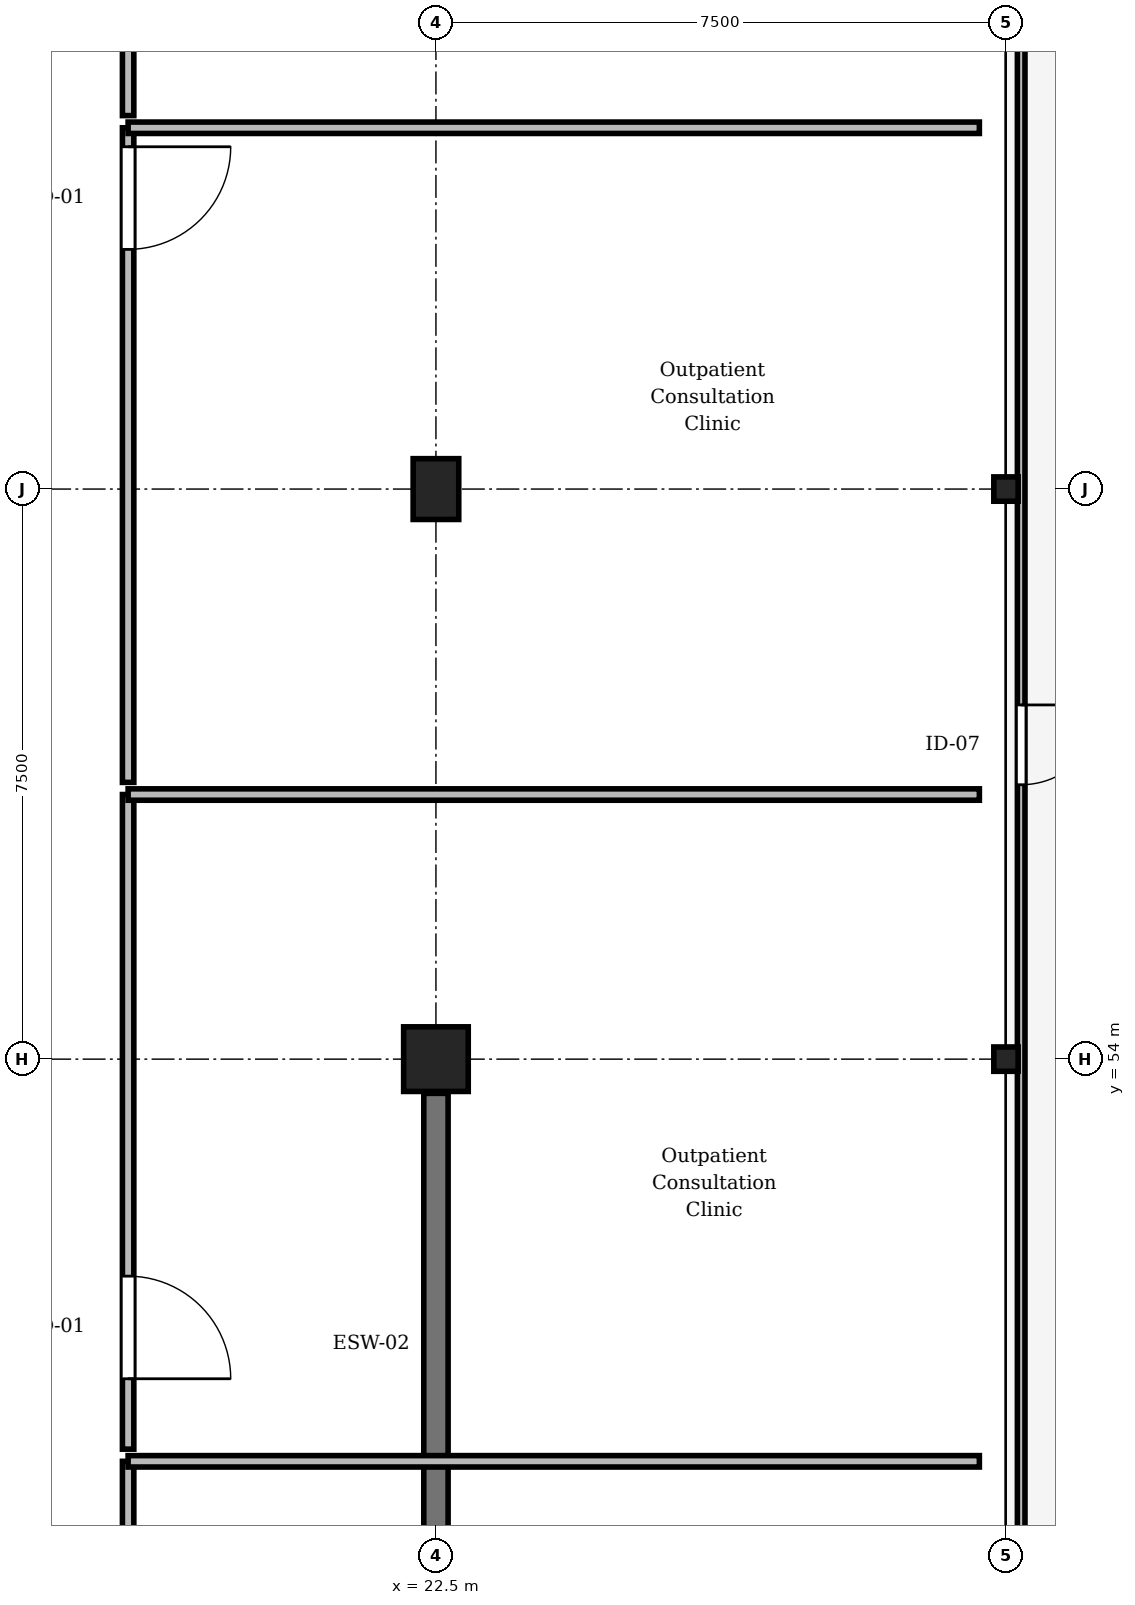
"""IFC4 building model, lengths in metres.
Left out: names, types, materials, properties, quantities, classifications, styles, units other than length and angle.
Written with IfcOpenShell. Run it as: python <this file> out.ifc"""

import sys

from ifc_helpers import new_model, si_unit, direction, frame, frame_2d, origin, origin_2d, place, context, subcontext, project, spatial, rectangle, extrude, element, fill, save


model = new_model("IFC4")
c1 = context("Model", 3, precision=1e-05, world=origin(), true_north=direction((0.0, 1.0)))
c2 = subcontext(c1, "Body", "Model", "MODEL_VIEW")
j1 = project(units=[si_unit("LENGTHUNIT", "METRE"), si_unit("PLANEANGLEUNIT", "RADIAN")], contexts=[c1])
p1 = place(None, origin())
s1 = spatial("IfcSite", under=j1, at=p1, CompositionType="ELEMENT")
p2 = place(p1, origin())
s2 = spatial("IfcBuilding", under=s1, at=p2, CompositionType="ELEMENT")
p3 = place(p2, frame((0.0, 0.0, 4.8)))
s3 = spatial("IfcBuildingStorey", under=s2, at=p3, CompositionType="ELEMENT", Elevation=4.8)
p4 = place(p3, frame((22.5, 54.0, 0.0), z_axis=(0.0, 0.0, 1.0), x_axis=(1.0, 0.0, 0.0)))
e1 = element("IfcColumn", 1, at=p4, inside=s3, PredefinedType="COLUMN", context=c2, shape_type="SweptSolid", body=[
    extrude(rectangle(XDim=0.85, YDim=0.85, at=origin_2d()), origin(), (0.0, 0.0, 1.0), 4.5),
])
p5 = place(p3, frame((22.5, 61.5, 0.0), z_axis=(0.0, 0.0, 1.0), x_axis=(1.0, 0.0, 0.0)))
e2 = element("IfcColumn", 2, at=p5, inside=s3, PredefinedType="COLUMN", context=c2, shape_type="SweptSolid", body=[
    extrude(rectangle(XDim=0.6, YDim=0.8, at=origin_2d()), origin(), (0.0, 0.0, 1.0), 4.5),
])
for number, where, z_axis, x_axis in (
    (3, (30.0, 54.0, 0.0), (0.0, 0.0, 1.0), (1.0, 0.0, 0.0)),
    (4, (30.0, 61.5, 0.0), (0.0, 0.0, 1.0), (1.0, 0.0, 0.0)),
):
    element("IfcColumn", number, at=place(p3, frame(where, z_axis=z_axis, x_axis=x_axis)), inside=s3, PredefinedType="COLUMN", context=c2, shape_type="SweptSolid", body=[
        extrude(rectangle(XDim=0.32, YDim=0.32, at=origin_2d()), origin(), (0.0, 0.0, 1.0), 4.5),
    ])
p6 = place(p3, frame((22.5, 46.95, 0.0), z_axis=(0.0, 0.0, 1.0), x_axis=(0.0, 1.0, 0.0)))
e5 = element("IfcWall", 5, at=p6, inside=s3, PredefinedType="SHEAR", context=c2, shape_type="SweptSolid", body=[
    extrude(rectangle(XDim=6.6, YDim=0.32, at=frame_2d((3.3, 0.0))), origin(), (0.0, 0.0, 1.0), 3.63),
])
p7 = place(p3, frame((18.45, 48.709, 0.0), z_axis=(0.0, 0.0, 1.0), x_axis=(0.0, -1.0, 0.0)))
e6 = element("IfcWall", 6, at=p7, inside=s3, PredefinedType="PARTITIONING", context=c2, shape_type="SweptSolid", body=[
    extrude(rectangle(XDim=8.612, YDim=0.15, at=frame_2d((4.306, 0.0))), origin(), (0.0, 0.0, 1.0), 3.765),
])
p8 = place(p7, frame((4.983, 0.0, 0.0)))
e7 = element("IfcOpeningElement", 7, at=p8, cuts=e6, PredefinedType="OPENING", context=c2, shape_type="SweptSolid", body=[
    extrude(rectangle(XDim=1.35, YDim=2.25, at=frame_2d((0.675, 1.125))), frame((0.0, 0.085, 0.0), z_axis=(0.0, -1.0, 0.0), x_axis=(1.0, 0.0, 0.0)), (0.0, 0.0, 1.0), 0.17),
])
p9 = place(p3, frame((18.45, 57.481, 0.0), z_axis=(0.0, 0.0, 1.0), x_axis=(0.0, -1.0, 0.0)))
e8 = element("IfcWall", 8, at=p9, inside=s3, PredefinedType="PARTITIONING", context=c2, shape_type="SweptSolid", body=[
    extrude(rectangle(XDim=8.612, YDim=0.15, at=frame_2d((4.306, 0.0))), origin(), (0.0, 0.0, 1.0), 3.765),
])
p10 = place(p9, frame((6.336, 0.0, 0.0)))
e9 = element("IfcOpeningElement", 9, at=p10, cuts=e8, PredefinedType="OPENING", context=c2, shape_type="SweptSolid", body=[
    extrude(rectangle(XDim=1.35, YDim=2.25, at=frame_2d((0.675, 1.125))), frame((0.0, 0.085, 0.0), z_axis=(0.0, -1.0, 0.0), x_axis=(1.0, 0.0, 0.0)), (0.0, 0.0, 1.0), 0.17),
])
p11 = place(p3, frame((18.45, 66.253, 0.0), z_axis=(0.0, 0.0, 1.0), x_axis=(0.0, -1.0, 0.0)))
e10 = element("IfcWall", 10, at=p11, inside=s3, PredefinedType="PARTITIONING", context=c2, shape_type="SweptSolid", body=[
    extrude(rectangle(XDim=8.612, YDim=0.15, at=frame_2d((4.306, 0.0))), origin(), (0.0, 0.0, 1.0), 3.765),
])
p12 = place(p11, frame((0.25, 0.0, 0.0)))
e11 = element("IfcOpeningElement", 11, at=p12, cuts=e10, PredefinedType="OPENING", context=c2, shape_type="SweptSolid", body=[
    extrude(rectangle(XDim=1.35, YDim=2.25, at=frame_2d((0.675, 1.125))), frame((0.0, 0.085, 0.0), z_axis=(0.0, -1.0, 0.0), x_axis=(1.0, 0.0, 0.0)), (0.0, 0.0, 1.0), 0.17),
])
p13 = place(p3, frame((18.45, 75.026, 0.0), z_axis=(0.0, 0.0, 1.0), x_axis=(0.0, -1.0, 0.0)))
e12 = element("IfcWall", 12, at=p13, inside=s3, PredefinedType="PARTITIONING", context=c2, shape_type="SweptSolid", body=[
    extrude(rectangle(XDim=8.612, YDim=0.15, at=frame_2d((4.306, 0.0))), origin(), (0.0, 0.0, 1.0), 3.765),
])
p14 = place(p13, frame((1.603, 0.0, 0.0)))
e13 = element("IfcOpeningElement", 13, at=p14, cuts=e12, PredefinedType="OPENING", context=c2, shape_type="SweptSolid", body=[
    extrude(rectangle(XDim=1.35, YDim=2.25, at=frame_2d((0.675, 1.125))), frame((0.0, 0.085, 0.0), z_axis=(0.0, -1.0, 0.0), x_axis=(1.0, 0.0, 0.0)), (0.0, 0.0, 1.0), 0.17),
])
p15 = place(p3, frame((30.2, 76.15, 0.0), z_axis=(0.0, 0.0, 1.0), x_axis=(0.0, -1.0, 0.0)))
e14 = element("IfcWall", 14, at=p15, inside=s3, PredefinedType="PARTITIONING", context=c2, shape_type="SweptSolid", body=[
    extrude(rectangle(XDim=44.65, YDim=0.1, at=frame_2d((22.325, 0.0))), origin(), (0.0, 0.0, 1.0), 3.615),
])
p16 = place(p15, frame((17.49, 0.0, 0.0)))
e15 = element("IfcOpeningElement", 15, at=p16, cuts=e14, PredefinedType="OPENING", context=c2, shape_type="SweptSolid", body=[
    extrude(rectangle(XDim=1.05, YDim=2.2, at=frame_2d((0.525, 1.1))), frame((0.0, 0.06, 0.0), z_axis=(0.0, -1.0, 0.0), x_axis=(1.0, 0.0, 0.0)), (0.0, 0.0, 1.0), 0.12),
])
for number, where, z_axis, x_axis in (
    (16, (18.45, 48.709, 0.0), (0.0, 0.0, 1.0), (1.0, 0.0, 0.0)),
    (17, (18.45, 57.481, 0.0), (0.0, 0.0, 1.0), (1.0, 0.0, 0.0)),
    (18, (18.45, 66.253, 0.0), (0.0, 0.0, 1.0), (1.0, 0.0, 0.0)),
):
    element("IfcWall", number, at=place(p3, frame(where, z_axis=z_axis, x_axis=x_axis)), inside=s3, PredefinedType="PARTITIONING", context=c2, shape_type="SweptSolid", body=[
        extrude(rectangle(XDim=11.2, YDim=0.15, at=frame_2d((5.6, 0.0))), origin(), (0.0, 0.0, 1.0), 4.165),
    ])
p17 = place(p10, origin())
e19 = element("IfcDoor", 19, at=p17, inside=s3, OperationType="SINGLE_SWING_RIGHT", PredefinedType="DOOR", context=c2, shape_type="SweptSolid", body=[
    extrude(rectangle(XDim=1.35, YDim=2.25, at=frame_2d((0.675, 1.125))), frame((0.0, 0.025, 0.0), z_axis=(0.0, -1.0, 0.0), x_axis=(1.0, 0.0, 0.0)), (0.0, 0.0, 1.0), 0.05),
])
fill(e9, e19)
p18 = place(p12, origin())
e20 = element("IfcDoor", 20, at=p18, inside=s3, OperationType="SINGLE_SWING_LEFT", PredefinedType="DOOR", context=c2, shape_type="SweptSolid", body=[
    extrude(rectangle(XDim=1.35, YDim=2.25, at=frame_2d((0.675, 1.125))), frame((0.0, 0.025, 0.0), z_axis=(0.0, -1.0, 0.0), x_axis=(1.0, 0.0, 0.0)), (0.0, 0.0, 1.0), 0.05),
])
fill(e11, e20)
p19 = place(p16, origin())
e21 = element("IfcDoor", 21, at=p19, inside=s3, OperationType="SINGLE_SWING_LEFT", PredefinedType="DOOR", context=c2, shape_type="SweptSolid", body=[
    extrude(rectangle(XDim=1.05, YDim=2.2, at=frame_2d((0.525, 1.1))), frame((0.0, 0.025, 0.0), z_axis=(0.0, -1.0, 0.0), x_axis=(1.0, 0.0, 0.0)), (0.0, 0.0, 1.0), 0.05),
])
fill(e15, e21)
save(model, sys.argv[1])
